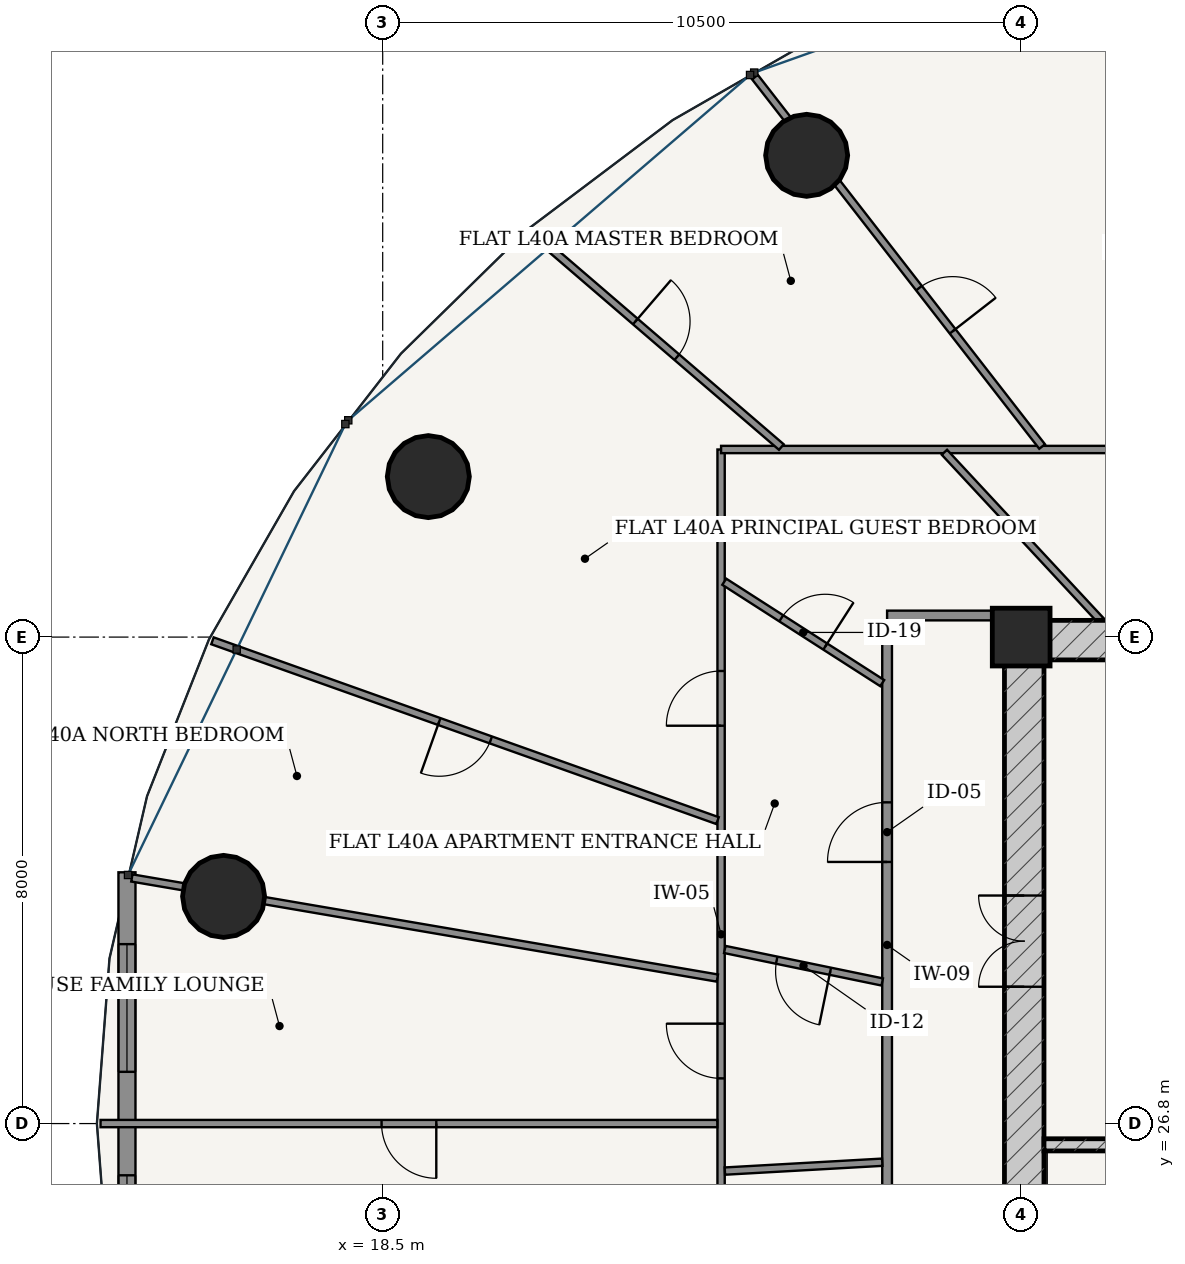
"""IFC4 building model, lengths in metres.
Left out: names, types, materials, properties, quantities, classifications, styles, units other than length and angle.
Written with IfcOpenShell. Run it as: python <this file> out.ifc"""

import sys

from ifc_helpers import new_model, si_unit, direction, frame, frame_2d, origin, origin_2d, place, context, subcontext, project, spatial, rectangle, hollow_circle, extrude, source, transform, mapped, element, fill, save


model = new_model("IFC4")
c1 = context("Model", 3, precision=1e-05, world=origin(), true_north=direction((-0.2419218956, 0.970295726276)))
c2 = subcontext(c1, "Body", "Model", "MODEL_VIEW")
j1 = project(units=[si_unit("LENGTHUNIT", "METRE"), si_unit("PLANEANGLEUNIT", "RADIAN")], contexts=[c1])
p1 = place(None, origin())
s1 = spatial("IfcSite", under=j1, at=p1, CompositionType="ELEMENT")
p2 = place(p1, origin())
s2 = spatial("IfcBuilding", under=s1, at=p2, CompositionType="ELEMENT")
p3 = place(p2, frame((0.0, 0.0, 153.4)))
s3 = spatial("IfcBuildingStorey", under=s2, at=p3, CompositionType="ELEMENT", Elevation=153.4)
p4 = place(p3, frame((29.0, 34.8, 0.0), z_axis=(0.0, 0.0, 1.0), x_axis=(1.0, 0.0, 0.0)))
e1 = element("IfcColumn", 1, at=p4, inside=s3, PredefinedType="COLUMN", context=c2, shape_type="SweptSolid", body=[
    extrude(rectangle(XDim=0.95, YDim=0.95, at=origin_2d()), origin(), (0.0, 0.0, 1.0), 3.6),
])
p5 = place(p3, frame((28.725, 34.75, 0.0), z_axis=(0.0, 0.0, 1.0), x_axis=(1.0, 0.0, 0.0)))
e2 = element("IfcWall", 2, at=p5, inside=s3, PredefinedType="SHEAR", context=c2, shape_type="SweptSolid", body=[
    extrude(rectangle(XDim=18.55, YDim=0.65, at=frame_2d((9.275, 0.0))), origin(), (0.0, 0.0, 1.0), 3.33),
])
p6 = place(p3, frame((29.05, 19.175, 0.0), z_axis=(0.0, 0.0, 1.0), x_axis=(0.0, 1.0, 0.0)))
e3 = element("IfcWall", 3, at=p6, inside=s3, PredefinedType="SHEAR", context=c2, shape_type="SweptSolid", body=[
    extrude(rectangle(XDim=15.25, YDim=0.65, at=frame_2d((7.625, 0.0))), origin(), (0.0, 0.0, 1.0), 3.33),
])
p7 = place(p6, frame((9.875, 0.0, 0.0)))
e4 = element("IfcOpeningElement", 4, at=p7, cuts=e3, PredefinedType="OPENING", context=c2, shape_type="SweptSolid", body=[
    extrude(rectangle(XDim=1.5, YDim=2.2, at=frame_2d((0.75, 1.1))), frame((0.0, 0.335, 0.0), z_axis=(0.0, -1.0, 0.0), x_axis=(1.0, 0.0, 0.0)), (0.0, 0.0, 1.0), 0.67),
])
p8 = place(p3, frame((29.375, 26.45, 0.0), z_axis=(0.0, 0.0, 1.0), x_axis=(1.0, 0.0, 0.0)))
e5 = element("IfcWall", 5, at=p8, inside=s3, PredefinedType="SOLIDWALL", context=c2, shape_type="SweptSolid", body=[
    extrude(rectangle(XDim=3.32, YDim=0.2, at=frame_2d((1.66, 0.0))), origin(), (0.0, 0.0, 1.0), 3.33),
])
p9 = place(p8, frame((1.185, 0.0, 0.0)))
e6 = element("IfcOpeningElement", 6, at=p9, cuts=e5, PredefinedType="OPENING", context=c2, shape_type="SweptSolid", body=[
    extrude(rectangle(XDim=0.95, YDim=2.15, at=frame_2d((0.475, 1.075))), frame((0.0, 0.11, 0.0), z_axis=(0.0, -1.0, 0.0), x_axis=(1.0, 0.0, 0.0)), (0.0, 0.0, 1.0), 0.22),
])
for number, where, z_axis, x_axis in (
    (7, (25.472, 42.723, 0.0), (0.0, 0.0, 1.0), (1.0, 0.0, 0.0)),
    (8, (19.25, 37.439, 0.0), (0.0, 0.0, 1.0), (1.0, 0.0, 0.0)),
    (9, (15.883, 30.536, 0.0), (0.0, 0.0, 1.0), (1.0, 0.0, 0.0)),
):
    element("IfcColumn", number, at=place(p3, frame(where, z_axis=z_axis, x_axis=x_axis)), inside=s3, PredefinedType="COLUMN", context=c2, shape_type="SweptSolid", body=[
        extrude(hollow_circle(Radius=0.675, WallThickness=0.042, at=origin_2d()), origin(), (0.0, 0.0, 1.0), 3.6),
    ])
p10 = place(p3, frame((14.294, 30.932, 0.0), z_axis=(0.0, 0.0, 1.0), x_axis=(0.0, -1.0, 0.0)))
e10 = element("IfcWall", 10, at=p10, inside=s3, PredefinedType="SOLIDWALL", context=c2, shape_type="SweptSolid", body=[
    extrude(rectangle(XDim=8.264, YDim=0.28, at=frame_2d((4.132, 0.0))), origin(), (0.0, 0.0, 1.0), 3.33),
])
p11 = place(p10, frame((1.181, 0.0, 0.85)))
e11 = element("IfcOpeningElement", 11, at=p11, cuts=e10, PredefinedType="OPENING", context=c2, shape_type="SweptSolid", body=[
    extrude(rectangle(XDim=2.1, YDim=1.95, at=frame_2d((1.05, 0.975))), frame((0.0, 0.15, 0.0), z_axis=(0.0, -1.0, 0.0), x_axis=(1.0, 0.0, 0.0)), (0.0, 0.0, 1.0), 0.3),
])
p12 = place(p10, frame((4.983, 0.0, 0.85)))
e12 = element("IfcOpeningElement", 12, at=p12, cuts=e10, PredefinedType="OPENING", context=c2, shape_type="SweptSolid", body=[
    extrude(rectangle(XDim=2.1, YDim=1.95, at=frame_2d((1.05, 0.975))), frame((0.0, 0.15, 0.0), z_axis=(0.0, -1.0, 0.0), x_axis=(1.0, 0.0, 0.0)), (0.0, 0.0, 1.0), 0.3),
])
p13 = place(p3, frame((26.795, 24.4, 0.0), z_axis=(0.0, 0.0, 1.0), x_axis=(0.0, 1.0, 0.0)))
e13 = element("IfcWall", 13, at=p13, inside=s3, PredefinedType="PARTITIONING", context=c2, shape_type="SweptSolid", body=[
    extrude(rectangle(XDim=10.675, YDim=0.16, at=frame_2d((5.337, 0.0))), origin(), (0.0, 0.0, 1.0), 2.776),
])
p14 = place(p13, frame((6.702, 0.0, 0.0)))
e14 = element("IfcOpeningElement", 14, at=p14, cuts=e13, PredefinedType="OPENING", context=c2, shape_type="SweptSolid", body=[
    extrude(rectangle(XDim=0.98, YDim=2.2, at=frame_2d((0.49, 1.1))), frame((0.0, 0.09, 0.0), z_axis=(0.0, -1.0, 0.0), x_axis=(1.0, 0.0, 0.0)), (0.0, 0.0, 1.0), 0.18),
])
p15 = place(p3, frame((26.795, 35.155, 0.0), z_axis=(0.0, 0.0, 1.0), x_axis=(1.0, 0.0, 0.0)))
e15 = element("IfcWall", 15, at=p15, inside=s3, PredefinedType="PARTITIONING", context=c2, shape_type="SweptSolid", body=[
    extrude(rectangle(XDim=1.93, YDim=0.16, at=frame_2d((0.965, 0.0))), origin(), (0.0, 0.0, 1.0), 2.776),
])
p16 = place(p3, frame((24.065, 21.941, 0.0), z_axis=(0.0, 0.0, 1.0), x_axis=(0.0, 1.0, 0.0)))
e16 = element("IfcWall", 16, at=p16, inside=s3, PredefinedType="PARTITIONING", context=c2, shape_type="SweptSolid", body=[
    extrude(rectangle(XDim=15.944, YDim=0.12, at=frame_2d((7.972, 0.0))), origin(), (0.0, 0.0, 1.0), 2.776),
])
p17 = place(p16, frame((5.602, 0.0, 0.0)))
e17 = element("IfcOpeningElement", 17, at=p17, cuts=e16, PredefinedType="OPENING", context=c2, shape_type="SweptSolid", body=[
    extrude(rectangle(XDim=0.9, YDim=2.15, at=frame_2d((0.45, 1.075))), frame((0.0, 0.07, 0.0), z_axis=(0.0, -1.0, 0.0), x_axis=(1.0, 0.0, 0.0)), (0.0, 0.0, 1.0), 0.14),
])
p18 = place(p16, frame((1.707, 0.0, 0.0)))
e18 = element("IfcOpeningElement", 18, at=p18, cuts=e16, PredefinedType="OPENING", context=c2, shape_type="SweptSolid", body=[
    extrude(rectangle(XDim=0.9, YDim=2.15, at=frame_2d((0.45, 1.075))), frame((0.0, 0.07, 0.0), z_axis=(0.0, -1.0, 0.0), x_axis=(1.0, 0.0, 0.0)), (0.0, 0.0, 1.0), 0.14),
])
p19 = place(p16, frame((11.402, 0.0, 0.0)))
e19 = element("IfcOpeningElement", 19, at=p19, cuts=e16, PredefinedType="OPENING", context=c2, shape_type="SweptSolid", body=[
    extrude(rectangle(XDim=0.9, YDim=2.15, at=frame_2d((0.45, 1.075))), frame((0.0, 0.07, 0.0), z_axis=(0.0, -1.0, 0.0), x_axis=(1.0, 0.0, 0.0)), (0.0, 0.0, 1.0), 0.14),
])
p20 = place(p3, frame((24.065, 37.885, 0.0), z_axis=(0.0, 0.0, 1.0), x_axis=(1.0, 0.0, 0.0)))
e20 = element("IfcWall", 20, at=p20, inside=s3, PredefinedType="PARTITIONING", context=c2, shape_type="SweptSolid", body=[
    extrude(rectangle(XDim=7.47, YDim=0.12, at=frame_2d((3.735, 0.0))), origin(), (0.0, 0.0, 1.0), 2.776),
])
p21 = place(p3, frame((29.344, 37.934, 0.0), z_axis=(0.0, 0.0, 1.0), x_axis=(-0.613758289074, 0.789493991487, 0.0)))
e21 = element("IfcWall", 21, at=p21, inside=s3, PredefinedType="PARTITIONING", context=c2, shape_type="SweptSolid", body=[
    extrude(rectangle(XDim=7.695, YDim=0.12, at=frame_2d((3.848, 0.0))), origin(), (0.0, 0.0, 1.0), 2.776),
])
p22 = place(p21, frame((2.399, 0.0, 0.0)))
e22 = element("IfcOpeningElement", 22, at=p22, cuts=e21, PredefinedType="OPENING", context=c2, shape_type="SweptSolid", body=[
    extrude(rectangle(XDim=0.9, YDim=2.15, at=frame_2d((0.45, 1.075))), frame((0.0, 0.07, 0.0), z_axis=(0.0, -1.0, 0.0), x_axis=(1.0, 0.0, 0.0)), (0.0, 0.0, 1.0), 0.14),
])
p23 = place(p3, frame((25.056, 37.925, 0.0), z_axis=(0.0, 0.0, 1.0), x_axis=(-0.758354915574, 0.65184186888, 0.0)))
e23 = element("IfcWall", 23, at=p23, inside=s3, PredefinedType="PARTITIONING", context=c2, shape_type="SweptSolid", body=[
    extrude(rectangle(XDim=5.432, YDim=0.12, at=frame_2d((2.716, 0.0))), origin(), (0.0, 0.0, 1.0), 2.846),
])
p24 = place(p23, frame((2.266, 0.0, 0.0)))
e24 = element("IfcOpeningElement", 24, at=p24, cuts=e23, PredefinedType="OPENING", context=c2, shape_type="SweptSolid", body=[
    extrude(rectangle(XDim=0.9, YDim=2.15, at=frame_2d((0.45, 1.075))), frame((0.0, 0.07, 0.0), z_axis=(0.0, -1.0, 0.0), x_axis=(1.0, 0.0, 0.0)), (0.0, 0.0, 1.0), 0.14),
])
p25 = place(p3, frame((24.007, 31.782, 0.0), z_axis=(0.0, 0.0, 1.0), x_axis=(-0.942077868165, 0.335394231187, 0.0)))
e25 = element("IfcWall", 25, at=p25, inside=s3, PredefinedType="PARTITIONING", context=c2, shape_type="SweptSolid", body=[
    extrude(rectangle(XDim=8.817, YDim=0.12, at=frame_2d((4.408, 0.0))), origin(), (0.0, 0.0, 1.0), 2.846),
])
p26 = place(p25, frame((3.958, 0.0, 0.0)))
e26 = element("IfcOpeningElement", 26, at=p26, cuts=e25, PredefinedType="OPENING", context=c2, shape_type="SweptSolid", body=[
    extrude(rectangle(XDim=0.9, YDim=2.15, at=frame_2d((0.45, 1.075))), frame((0.0, 0.07, 0.0), z_axis=(0.0, -1.0, 0.0), x_axis=(1.0, 0.0, 0.0)), (0.0, 0.0, 1.0), 0.14),
])
p27 = place(p3, frame((24.004, 29.193, 0.0), z_axis=(0.0, 0.0, 1.0), x_axis=(-0.985698378271, 0.168519159369, 0.0)))
e27 = element("IfcWall", 27, at=p27, inside=s3, PredefinedType="PARTITIONING", context=c2, shape_type="SweptSolid", body=[
    extrude(rectangle(XDim=9.769, YDim=0.12, at=frame_2d((4.884, 0.0))), origin(), (0.0, 0.0, 1.0), 2.776),
])
p28 = place(p3, frame((24.003, 26.8, 0.0), z_axis=(0.0, 0.0, 1.0), x_axis=(-1.0, 0.0, 0.0)))
e28 = element("IfcWall", 28, at=p28, inside=s3, PredefinedType="PARTITIONING", context=c2, shape_type="SweptSolid", body=[
    extrude(rectangle(XDim=10.143, YDim=0.12, at=frame_2d((5.071, 0.0))), origin(), (0.0, 0.0, 1.0), 2.846),
])
p29 = place(p28, frame((4.622, 0.0, 0.0)))
e29 = element("IfcOpeningElement", 29, at=p29, cuts=e28, PredefinedType="OPENING", context=c2, shape_type="SweptSolid", body=[
    extrude(rectangle(XDim=0.9, YDim=2.15, at=frame_2d((0.45, 1.075))), frame((0.0, 0.07, 0.0), z_axis=(0.0, -1.0, 0.0), x_axis=(1.0, 0.0, 0.0)), (0.0, 0.0, 1.0), 0.14),
])
p30 = place(p3, frame((30.307, 35.075, 0.0), z_axis=(0.0, 0.0, 1.0), x_axis=(-0.68082810609, 0.732443233267, 0.0)))
e30 = element("IfcWall", 30, at=p30, inside=s3, PredefinedType="PARTITIONING", context=c2, shape_type="SweptSolid", body=[
    extrude(rectangle(XDim=3.775, YDim=0.12, at=frame_2d((1.887, 0.0))), origin(), (0.0, 0.0, 1.0), 2.776),
])
p31 = place(p3, frame((26.715, 34.043, 0.0), z_axis=(0.0, 0.0, 1.0), x_axis=(-0.841597086151, 0.540105864235, 0.0)))
e31 = element("IfcWall", 31, at=p31, inside=s3, PredefinedType="PARTITIONING", context=c2, shape_type="SweptSolid", body=[
    extrude(rectangle(XDim=3.087, YDim=0.12, at=frame_2d((1.543, 0.0))), origin(), (0.0, 0.0, 1.0), 3.005),
])
p32 = place(p31, frame((1.113, 0.0, 0.0)))
e32 = element("IfcOpeningElement", 32, at=p32, cuts=e31, PredefinedType="OPENING", context=c2, shape_type="SweptSolid", body=[
    extrude(rectangle(XDim=0.86, YDim=2.15, at=frame_2d((0.43, 1.075))), frame((0.0, 0.07, 0.0), z_axis=(0.0, -1.0, 0.0), x_axis=(1.0, 0.0, 0.0)), (0.0, 0.0, 1.0), 0.14),
])
p33 = place(p3, frame((26.715, 29.129, 0.0), z_axis=(0.0, 0.0, 1.0), x_axis=(-0.979376501526, 0.202043728582, 0.0)))
e33 = element("IfcWall", 33, at=p33, inside=s3, PredefinedType="PARTITIONING", context=c2, shape_type="SweptSolid", body=[
    extrude(rectangle(XDim=2.644, YDim=0.12, at=frame_2d((1.322, 0.0))), origin(), (0.0, 0.0, 1.0), 3.33),
])
p34 = place(p33, frame((0.872, 0.0, 0.0)))
e34 = element("IfcOpeningElement", 34, at=p34, cuts=e33, PredefinedType="OPENING", context=c2, shape_type="SweptSolid", body=[
    extrude(rectangle(XDim=0.9, YDim=2.15, at=frame_2d((0.45, 1.075))), frame((0.0, 0.07, 0.0), z_axis=(0.0, -1.0, 0.0), x_axis=(1.0, 0.0, 0.0)), (0.0, 0.0, 1.0), 0.14),
])
p35 = place(p3, frame((26.715, 26.164, 0.0), z_axis=(0.0, 0.0, 1.0), x_axis=(-0.998418047295, -0.056226353574, 0.0)))
e35 = element("IfcWall", 35, at=p35, inside=s3, PredefinedType="PARTITIONING", context=c2, shape_type="SweptSolid", body=[
    extrude(rectangle(XDim=2.592, YDim=0.12, at=frame_2d((1.296, 0.0))), origin(), (0.0, 0.0, 1.0), 3.33),
])
m1 = source(origin(), c2, "Body", "SweptSolid", [
    extrude(rectangle(XDim=2.1, YDim=1.95, at=frame_2d((1.05, 0.975))), frame((0.0, 0.03, 0.0), z_axis=(0.0, -1.0, 0.0), x_axis=(1.0, 0.0, 0.0)), (0.0, 0.0, 1.0), 0.06),
])
p36 = place(p11, origin())
e36 = element("IfcWindow", 36, at=p36, inside=s3, PartitioningType="SINGLE_PANEL", PredefinedType="WINDOW", context=c2, shape_type="MappedRepresentation", body=[
    mapped(m1, transform((0.0, 0.0, 0.0), scale=1.0)),
])
fill(e11, e36)
p37 = place(p12, origin())
e37 = element("IfcWindow", 37, at=p37, inside=s3, PartitioningType="SINGLE_PANEL", PredefinedType="WINDOW", context=c2, shape_type="MappedRepresentation", body=[
    mapped(m1, transform((0.0, 0.0, 0.0), scale=1.0)),
])
fill(e12, e37)
m2 = source(origin(), c2, "Body", "SweptSolid", [
    extrude(rectangle(XDim=1.5, YDim=2.2, at=frame_2d((0.75, 1.1))), frame((0.0, 0.025, 0.0), z_axis=(0.0, -1.0, 0.0), x_axis=(1.0, 0.0, 0.0)), (0.0, 0.0, 1.0), 0.05),
])
p38 = place(p7, origin())
e38 = element("IfcDoor", 38, at=p38, inside=s3, OperationType="DOUBLE_DOOR_SINGLE_SWING", PredefinedType="DOOR", context=c2, shape_type="MappedRepresentation", body=[
    mapped(m2, transform((0.0, 0.0, 0.0), scale=1.0)),
])
fill(e4, e38)
m3 = source(origin(), c2, "Body", "SweptSolid", [
    extrude(rectangle(XDim=0.98, YDim=2.2, at=frame_2d((0.49, 1.1))), frame((0.0, 0.025, 0.0), z_axis=(0.0, -1.0, 0.0), x_axis=(1.0, 0.0, 0.0)), (0.0, 0.0, 1.0), 0.05),
])
p39 = place(p14, origin())
e39 = element("IfcDoor", 39, at=p39, inside=s3, OperationType="SINGLE_SWING_LEFT", PredefinedType="DOOR", context=c2, shape_type="MappedRepresentation", body=[
    mapped(m3, transform((0.0, 0.0, 0.0), scale=1.0)),
])
fill(e14, e39)
m4 = source(origin(), c2, "Body", "SweptSolid", [
    extrude(rectangle(XDim=0.86, YDim=2.15, at=frame_2d((0.43, 1.075))), frame((0.0, 0.025, 0.0), z_axis=(0.0, -1.0, 0.0), x_axis=(1.0, 0.0, 0.0)), (0.0, 0.0, 1.0), 0.05),
])
p40 = place(p32, frame((0.86, 0.0, 0.0), z_axis=(0.0, 0.0, 1.0), x_axis=(-1.0, 0.0, 0.0)))
e40 = element("IfcDoor", 40, at=p40, inside=s3, OperationType="SINGLE_SWING_RIGHT", PredefinedType="DOOR", context=c2, shape_type="MappedRepresentation", body=[
    mapped(m4, transform((0.0, 0.0, 0.0), scale=1.0)),
])
fill(e32, e40)
m5 = source(origin(), c2, "Body", "SweptSolid", [
    extrude(rectangle(XDim=0.9, YDim=2.15, at=frame_2d((0.45, 1.075))), frame((0.0, 0.025, 0.0), z_axis=(0.0, -1.0, 0.0), x_axis=(1.0, 0.0, 0.0)), (0.0, 0.0, 1.0), 0.05),
])
p41 = place(p34, origin())
e41 = element("IfcDoor", 41, at=p41, inside=s3, OperationType="SINGLE_SWING_LEFT", PredefinedType="DOOR", context=c2, shape_type="MappedRepresentation", body=[
    mapped(m5, transform((0.0, 0.0, 0.0), scale=1.0)),
])
fill(e34, e41)
p42 = place(p17, origin())
e42 = element("IfcDoor", 42, at=p42, inside=s3, OperationType="SINGLE_SWING_RIGHT", PredefinedType="DOOR", context=c2, shape_type="MappedRepresentation", body=[
    mapped(m5, transform((0.0, 0.0, 0.0), scale=1.0)),
])
fill(e17, e42)
p43 = place(p29, origin())
e43 = element("IfcDoor", 43, at=p43, inside=s3, OperationType="SINGLE_SWING_LEFT", PredefinedType="DOOR", context=c2, shape_type="MappedRepresentation", body=[
    mapped(m5, transform((0.0, 0.0, 0.0), scale=1.0)),
])
fill(e29, e43)
p44 = place(p19, origin())
e44 = element("IfcDoor", 44, at=p44, inside=s3, OperationType="SINGLE_SWING_LEFT", PredefinedType="DOOR", context=c2, shape_type="MappedRepresentation", body=[
    mapped(m5, transform((0.0, 0.0, 0.0), scale=1.0)),
])
fill(e19, e44)
p45 = place(p26, origin())
e45 = element("IfcDoor", 45, at=p45, inside=s3, OperationType="SINGLE_SWING_RIGHT", PredefinedType="DOOR", context=c2, shape_type="MappedRepresentation", body=[
    mapped(m5, transform((0.0, 0.0, 0.0), scale=1.0)),
])
fill(e26, e45)
p46 = place(p24, frame((0.9, 0.0, 0.0), z_axis=(0.0, 0.0, 1.0), x_axis=(-1.0, 0.0, 0.0)))
e46 = element("IfcDoor", 46, at=p46, inside=s3, OperationType="SINGLE_SWING_LEFT", PredefinedType="DOOR", context=c2, shape_type="MappedRepresentation", body=[
    mapped(m5, transform((0.0, 0.0, 0.0), scale=1.0)),
])
fill(e24, e46)
p47 = place(p22, frame((0.9, 0.0, 0.0), z_axis=(0.0, 0.0, 1.0), x_axis=(-1.0, 0.0, 0.0)))
e47 = element("IfcDoor", 47, at=p47, inside=s3, OperationType="SINGLE_SWING_RIGHT", PredefinedType="DOOR", context=c2, shape_type="MappedRepresentation", body=[
    mapped(m5, transform((0.0, 0.0, 0.0), scale=1.0)),
])
fill(e22, e47)
save(model, sys.argv[1])
